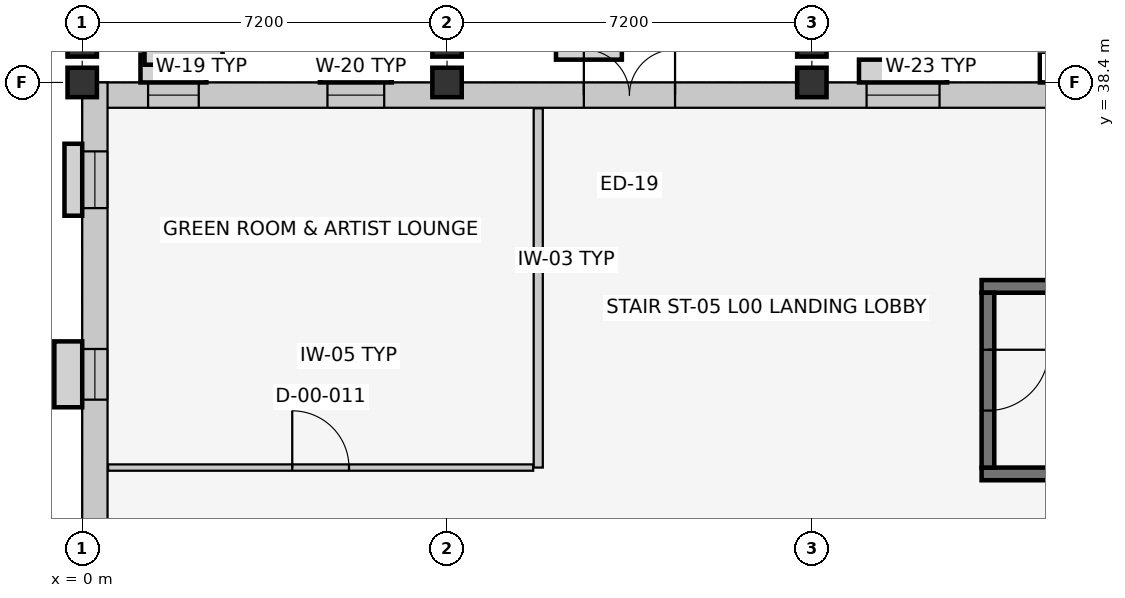
"""IFC4 building model, lengths in metres.
Left out: names, types, materials, properties, quantities, classifications, styles, units other than length and angle.
Written with IfcOpenShell. Run it as: python <this file> out.ifc"""

import sys

from ifc_helpers import new_model, si_unit, direction, frame, frame_2d, origin, origin_2d, place, context, subcontext, project, spatial, rectangle, extrude, element, fill, save


model = new_model("IFC4")
c1 = context("Model", 3, precision=1e-05, world=origin(), true_north=direction((0.0, 1.0)))
c2 = subcontext(c1, "Body", "Model", "MODEL_VIEW")
j1 = project(units=[si_unit("LENGTHUNIT", "METRE"), si_unit("PLANEANGLEUNIT", "RADIAN")], contexts=[c1])
p1 = place(None, origin())
s1 = spatial("IfcSite", under=j1, at=p1, CompositionType="ELEMENT")
p2 = place(p1, origin())
s2 = spatial("IfcBuilding", under=s1, at=p2, CompositionType="ELEMENT")
p3 = place(p2, origin())
s3 = spatial("IfcBuildingStorey", under=s2, at=p3, CompositionType="ELEMENT", Elevation=0.0)
for number, where, z_axis, x_axis in (
    (1, (0.0, 38.4, 0.0), (0.0, 0.0, 1.0), (1.0, 0.0, 0.0)),
    (2, (7.2, 38.4, 0.0), (0.0, 0.0, 1.0), (1.0, 0.0, 0.0)),
    (3, (14.4, 38.4, 0.0), (0.0, 0.0, 1.0), (1.0, 0.0, 0.0)),
    (4, (0.0, 39.2, 0.0), (0.0, 0.0, 1.0), (1.0, 0.0, 0.0)),
    (5, (7.2, 39.2, 0.0), (0.0, 0.0, 1.0), (1.0, 0.0, 0.0)),
    (6, (14.4, 39.2, 0.0), (0.0, 0.0, 1.0), (1.0, 0.0, 0.0)),
):
    element("IfcColumn", number, at=place(p3, frame(where, z_axis=z_axis, x_axis=x_axis)), inside=s3, PredefinedType="COLUMN", context=c2, shape_type="SweptSolid", body=[
        extrude(rectangle(XDim=0.58, YDim=0.58, at=origin_2d()), origin(), (0.0, 0.0, 1.0), 5.4),
    ])
p4 = place(p3, frame((0.0, 38.15, 0.0), z_axis=(0.0, 0.0, 1.0), x_axis=(1.0, 0.0, 0.0)))
e7 = element("IfcWall", 7, at=p4, inside=s3, PredefinedType="SOLIDWALL", context=c2, shape_type="SweptSolid", body=[
    extrude(rectangle(XDim=57.6, YDim=0.5, at=frame_2d((28.8, 0.0))), origin(), (0.0, 0.0, 1.0), 4.395),
])
p5 = place(p4, frame((9.9, 0.0, 0.0)))
e8 = element("IfcOpeningElement", 8, at=p5, cuts=e7, PredefinedType="OPENING", context=c2, shape_type="SweptSolid", body=[
    extrude(rectangle(XDim=1.8, YDim=2.3, at=frame_2d((0.9, 1.15))), frame((0.0, 0.262, 0.0), z_axis=(0.0, -1.0, 0.0), x_axis=(1.0, 0.0, 0.0)), (0.0, 0.0, 1.0), 0.524),
])
p6 = place(p4, frame((1.3, 0.0, 0.9)))
e9 = element("IfcOpeningElement", 9, at=p6, cuts=e7, PredefinedType="OPENING", context=c2, shape_type="SweptSolid", body=[
    extrude(rectangle(XDim=1.0, YDim=1.75, at=frame_2d((0.5, 0.875))), frame((0.0, 0.262, 0.0), z_axis=(0.0, -1.0, 0.0), x_axis=(1.0, 0.0, 0.0)), (0.0, 0.0, 1.0), 0.524),
])
p7 = place(p4, frame((4.84, 0.0, 0.9)))
e10 = element("IfcOpeningElement", 10, at=p7, cuts=e7, PredefinedType="OPENING", context=c2, shape_type="SweptSolid", body=[
    extrude(rectangle(XDim=1.12, YDim=1.75, at=frame_2d((0.56, 0.875))), frame((0.0, 0.262, 0.0), z_axis=(0.0, -1.0, 0.0), x_axis=(1.0, 0.0, 0.0)), (0.0, 0.0, 1.0), 0.524),
])
p8 = place(p4, frame((15.48, 0.0, 0.9)))
e11 = element("IfcOpeningElement", 11, at=p8, cuts=e7, PredefinedType="OPENING", context=c2, shape_type="SweptSolid", body=[
    extrude(rectangle(XDim=1.44, YDim=1.75, at=frame_2d((0.72, 0.875))), frame((0.0, 0.262, 0.0), z_axis=(0.0, -1.0, 0.0), x_axis=(1.0, 0.0, 0.0)), (0.0, 0.0, 1.0), 0.524),
])
p9 = place(p4, frame((19.05, 0.0, 0.9)))
e12 = element("IfcOpeningElement", 12, at=p9, cuts=e7, PredefinedType="OPENING", context=c2, shape_type="SweptSolid", body=[
    extrude(rectangle(XDim=1.5, YDim=1.75, at=frame_2d((0.75, 0.875))), frame((0.0, 0.262, 0.0), z_axis=(0.0, -1.0, 0.0), x_axis=(1.0, 0.0, 0.0)), (0.0, 0.0, 1.0), 0.524),
])
p10 = place(p4, frame((22.95, 0.0, 0.9)))
e13 = element("IfcOpeningElement", 13, at=p10, cuts=e7, PredefinedType="OPENING", context=c2, shape_type="SweptSolid", body=[
    extrude(rectangle(XDim=0.9, YDim=1.35, at=frame_2d((0.45, 0.675))), frame((0.0, 0.262, 0.0), z_axis=(0.0, -1.0, 0.0), x_axis=(1.0, 0.0, 0.0)), (0.0, 0.0, 1.0), 0.524),
])
p11 = place(p4, frame((30.05, 0.0, 0.9)))
e14 = element("IfcOpeningElement", 14, at=p11, cuts=e7, PredefinedType="OPENING", context=c2, shape_type="SweptSolid", body=[
    extrude(rectangle(XDim=1.1, YDim=1.35, at=frame_2d((0.55, 0.675))), frame((0.0, 0.262, 0.0), z_axis=(0.0, -1.0, 0.0), x_axis=(1.0, 0.0, 0.0)), (0.0, 0.0, 1.0), 0.524),
])
p12 = place(p4, frame((33.6, 0.0, 0.9)))
e15 = element("IfcOpeningElement", 15, at=p12, cuts=e7, PredefinedType="OPENING", context=c2, shape_type="SweptSolid", body=[
    extrude(rectangle(XDim=1.2, YDim=1.35, at=frame_2d((0.6, 0.675))), frame((0.0, 0.262, 0.0), z_axis=(0.0, -1.0, 0.0), x_axis=(1.0, 0.0, 0.0)), (0.0, 0.0, 1.0), 0.524),
])
p13 = place(p4, frame((51.625, 0.0, 0.9)))
e16 = element("IfcOpeningElement", 16, at=p13, cuts=e7, PredefinedType="OPENING", context=c2, shape_type="SweptSolid", body=[
    extrude(rectangle(XDim=1.15, YDim=1.45, at=frame_2d((0.575, 0.725))), frame((0.0, 0.262, 0.0), z_axis=(0.0, -1.0, 0.0), x_axis=(1.0, 0.0, 0.0)), (0.0, 0.0, 1.0), 0.524),
])
p14 = place(p4, frame((55.175, 0.0, 0.9)))
e17 = element("IfcOpeningElement", 17, at=p14, cuts=e7, PredefinedType="OPENING", context=c2, shape_type="SweptSolid", body=[
    extrude(rectangle(XDim=1.25, YDim=1.45, at=frame_2d((0.625, 0.725))), frame((0.0, 0.262, 0.0), z_axis=(0.0, -1.0, 0.0), x_axis=(1.0, 0.0, 0.0)), (0.0, 0.0, 1.0), 0.524),
])
p15 = place(p3, frame((0.25, 0.0, 0.0), z_axis=(0.0, 0.0, 1.0), x_axis=(0.0, 1.0, 0.0)))
e18 = element("IfcWall", 18, at=p15, inside=s3, PredefinedType="SOLIDWALL", context=c2, shape_type="SweptSolid", body=[
    extrude(rectangle(XDim=38.4, YDim=0.5, at=frame_2d((19.2, 0.0))), origin(), (0.0, 0.0, 1.0), 4.255),
])
p16 = place(p15, frame((25.4, 0.0, 0.0)))
e19 = element("IfcOpeningElement", 19, at=p16, cuts=e18, PredefinedType="OPENING", context=c2, shape_type="SweptSolid", body=[
    extrude(rectangle(XDim=2.0, YDim=2.35, at=frame_2d((1.0, 1.175))), frame((0.0, 0.262, 0.0), z_axis=(0.0, -1.0, 0.0), x_axis=(1.0, 0.0, 0.0)), (0.0, 0.0, 1.0), 0.524),
])
p17 = place(p15, frame((1.245, 0.0, 0.9)))
e20 = element("IfcOpeningElement", 20, at=p17, cuts=e18, PredefinedType="OPENING", context=c2, shape_type="SweptSolid", body=[
    extrude(rectangle(XDim=1.35, YDim=1.45, at=frame_2d((0.675, 0.725))), frame((0.0, 0.262, 0.0), z_axis=(0.0, -1.0, 0.0), x_axis=(1.0, 0.0, 0.0)), (0.0, 0.0, 1.0), 0.524),
])
p18 = place(p15, frame((9.15, 0.0, 0.9)))
e21 = element("IfcOpeningElement", 21, at=p18, cuts=e18, PredefinedType="OPENING", context=c2, shape_type="SweptSolid", body=[
    extrude(rectangle(XDim=0.9, YDim=1.6, at=frame_2d((0.45, 0.8))), frame((0.0, 0.262, 0.0), z_axis=(0.0, -1.0, 0.0), x_axis=(1.0, 0.0, 0.0)), (0.0, 0.0, 1.0), 0.524),
])
p19 = place(p15, frame((16.705, 0.0, 0.9)))
e22 = element("IfcOpeningElement", 22, at=p19, cuts=e18, PredefinedType="OPENING", context=c2, shape_type="SweptSolid", body=[
    extrude(rectangle(XDim=1.15, YDim=1.6, at=frame_2d((0.575, 0.8))), frame((0.0, 0.262, 0.0), z_axis=(0.0, -1.0, 0.0), x_axis=(1.0, 0.0, 0.0)), (0.0, 0.0, 1.0), 0.524),
])
p20 = place(p15, frame((32.14, 0.0, 0.9)))
e23 = element("IfcOpeningElement", 23, at=p20, cuts=e18, PredefinedType="OPENING", context=c2, shape_type="SweptSolid", body=[
    extrude(rectangle(XDim=1.0, YDim=1.75, at=frame_2d((0.5, 0.875))), frame((0.0, 0.262, 0.0), z_axis=(0.0, -1.0, 0.0), x_axis=(1.0, 0.0, 0.0)), (0.0, 0.0, 1.0), 0.524),
])
p21 = place(p15, frame((35.92, 0.0, 0.9)))
e24 = element("IfcOpeningElement", 24, at=p21, cuts=e18, PredefinedType="OPENING", context=c2, shape_type="SweptSolid", body=[
    extrude(rectangle(XDim=1.12, YDim=1.75, at=frame_2d((0.56, 0.875))), frame((0.0, 0.262, 0.0), z_axis=(0.0, -1.0, 0.0), x_axis=(1.0, 0.0, 0.0)), (0.0, 0.0, 1.0), 0.524),
])
for number, where, z_axis, x_axis in (
    (25, (17.75, 30.675, 0.0), (0.0, 0.0, 1.0), (1.0, 0.0, 0.0)),
    (26, (26.65, 34.375, 0.0), (0.0, 0.0, 1.0), (-1.0, 0.0, 0.0)),
):
    element("IfcWall", number, at=place(p3, frame(where, z_axis=z_axis, x_axis=x_axis)), inside=s3, PredefinedType="SHEAR", context=c2, shape_type="SweptSolid", body=[
        extrude(rectangle(XDim=8.9, YDim=0.25, at=frame_2d((4.45, 0.0))), origin(), (0.0, 0.0, 1.0), 5.1),
    ])
p22 = place(p3, frame((17.875, 34.25, 0.0), z_axis=(0.0, 0.0, 1.0), x_axis=(0.0, -1.0, 0.0)))
e27 = element("IfcWall", 27, at=p22, inside=s3, PredefinedType="SHEAR", context=c2, shape_type="SweptSolid", body=[
    extrude(rectangle(XDim=3.45, YDim=0.25, at=frame_2d((1.725, 0.0))), origin(), (0.0, 0.0, 1.0), 5.1),
])
p23 = place(p22, frame((1.125, 0.0, 0.0)))
e28 = element("IfcOpeningElement", 28, at=p23, cuts=e27, PredefinedType="OPENING", context=c2, shape_type="SweptSolid", body=[
    extrude(rectangle(XDim=1.2, YDim=2.15, at=frame_2d((0.6, 1.075))), frame((0.0, 0.137, 0.0), z_axis=(0.0, -1.0, 0.0), x_axis=(1.0, 0.0, 0.0)), (0.0, 0.0, 1.0), 0.274),
])
p24 = place(p3, frame((9.0, 30.8, 0.0), z_axis=(0.0, 0.0, 1.0), x_axis=(0.0, 1.0, 0.0)))
e29 = element("IfcWall", 29, at=p24, inside=s3, PredefinedType="PARTITIONING", context=c2, shape_type="SweptSolid", body=[
    extrude(rectangle(XDim=7.09, YDim=0.18, at=frame_2d((3.545, 0.0))), origin(), (0.0, 0.0, 1.0), 5.1),
])
p25 = place(p3, frame((0.51, 30.8, 0.0), z_axis=(0.0, 0.0, 1.0), x_axis=(1.0, 0.0, 0.0)))
e30 = element("IfcWall", 30, at=p25, inside=s3, PredefinedType="PARTITIONING", context=c2, shape_type="SweptSolid", body=[
    extrude(rectangle(XDim=8.39, YDim=0.125, at=frame_2d((4.195, 0.0))), origin(), (0.0, 0.0, 1.0), 5.1),
])
p26 = place(p25, frame((3.635, 0.0, 0.0)))
e31 = element("IfcOpeningElement", 31, at=p26, cuts=e30, PredefinedType="OPENING", context=c2, shape_type="SweptSolid", body=[
    extrude(rectangle(XDim=1.12, YDim=2.15, at=frame_2d((0.56, 1.075))), frame((0.0, 0.074, 0.0), z_axis=(0.0, -1.0, 0.0), x_axis=(1.0, 0.0, 0.0)), (0.0, 0.0, 1.0), 0.149),
])
p27 = place(p5, origin())
e32 = element("IfcDoor", 32, at=p27, inside=s3, OperationType="DOUBLE_DOOR_SINGLE_SWING", PredefinedType="DOOR", context=c2, shape_type="SweptSolid", body=[
    extrude(rectangle(XDim=1.8, YDim=2.3, at=frame_2d((0.9, 1.15))), frame((0.0, 0.025, 0.0), z_axis=(0.0, -1.0, 0.0), x_axis=(1.0, 0.0, 0.0)), (0.0, 0.0, 1.0), 0.05),
])
fill(e8, e32)
p28 = place(p6, origin())
e33 = element("IfcWindow", 33, at=p28, inside=s3, PartitioningType="SINGLE_PANEL", PredefinedType="WINDOW", context=c2, shape_type="SweptSolid", body=[
    extrude(rectangle(XDim=1.0, YDim=1.75, at=frame_2d((0.5, 0.875))), frame((0.0, 0.03, 0.0), z_axis=(0.0, -1.0, 0.0), x_axis=(1.0, 0.0, 0.0)), (0.0, 0.0, 1.0), 0.06),
])
fill(e9, e33)
p29 = place(p7, origin())
e34 = element("IfcWindow", 34, at=p29, inside=s3, PartitioningType="SINGLE_PANEL", PredefinedType="WINDOW", context=c2, shape_type="SweptSolid", body=[
    extrude(rectangle(XDim=1.12, YDim=1.75, at=frame_2d((0.56, 0.875))), frame((0.0, 0.03, 0.0), z_axis=(0.0, -1.0, 0.0), x_axis=(1.0, 0.0, 0.0)), (0.0, 0.0, 1.0), 0.06),
])
fill(e10, e34)
p30 = place(p8, origin())
e35 = element("IfcWindow", 35, at=p30, inside=s3, PartitioningType="SINGLE_PANEL", PredefinedType="WINDOW", context=c2, shape_type="SweptSolid", body=[
    extrude(rectangle(XDim=1.44, YDim=1.75, at=frame_2d((0.72, 0.875))), frame((0.0, 0.03, 0.0), z_axis=(0.0, -1.0, 0.0), x_axis=(1.0, 0.0, 0.0)), (0.0, 0.0, 1.0), 0.06),
])
fill(e11, e35)
p31 = place(p20, origin())
e36 = element("IfcWindow", 36, at=p31, inside=s3, PartitioningType="SINGLE_PANEL", PredefinedType="WINDOW", context=c2, shape_type="SweptSolid", body=[
    extrude(rectangle(XDim=1.0, YDim=1.75, at=frame_2d((0.5, 0.875))), frame((0.0, 0.03, 0.0), z_axis=(0.0, -1.0, 0.0), x_axis=(1.0, 0.0, 0.0)), (0.0, 0.0, 1.0), 0.06),
])
fill(e23, e36)
p32 = place(p21, origin())
e37 = element("IfcWindow", 37, at=p32, inside=s3, PartitioningType="SINGLE_PANEL", PredefinedType="WINDOW", context=c2, shape_type="SweptSolid", body=[
    extrude(rectangle(XDim=1.12, YDim=1.75, at=frame_2d((0.56, 0.875))), frame((0.0, 0.03, 0.0), z_axis=(0.0, -1.0, 0.0), x_axis=(1.0, 0.0, 0.0)), (0.0, 0.0, 1.0), 0.06),
])
fill(e24, e37)
p33 = place(p23, origin())
e38 = element("IfcDoor", 38, at=p33, inside=s3, OperationType="SINGLE_SWING_LEFT", PredefinedType="DOOR", context=c2, shape_type="SweptSolid", body=[
    extrude(rectangle(XDim=1.2, YDim=2.15, at=frame_2d((0.6, 1.075))), frame((0.0, 0.025, 0.0), z_axis=(0.0, -1.0, 0.0), x_axis=(1.0, 0.0, 0.0)), (0.0, 0.0, 1.0), 0.05),
])
fill(e28, e38)
p34 = place(p26, origin())
e39 = element("IfcDoor", 39, at=p34, inside=s3, OperationType="SINGLE_SWING_LEFT", PredefinedType="DOOR", context=c2, shape_type="SweptSolid", body=[
    extrude(rectangle(XDim=1.12, YDim=2.15, at=frame_2d((0.56, 1.075))), frame((0.0, 0.025, 0.0), z_axis=(0.0, -1.0, 0.0), x_axis=(1.0, 0.0, 0.0)), (0.0, 0.0, 1.0), 0.05),
])
fill(e31, e39)
save(model, sys.argv[1])
